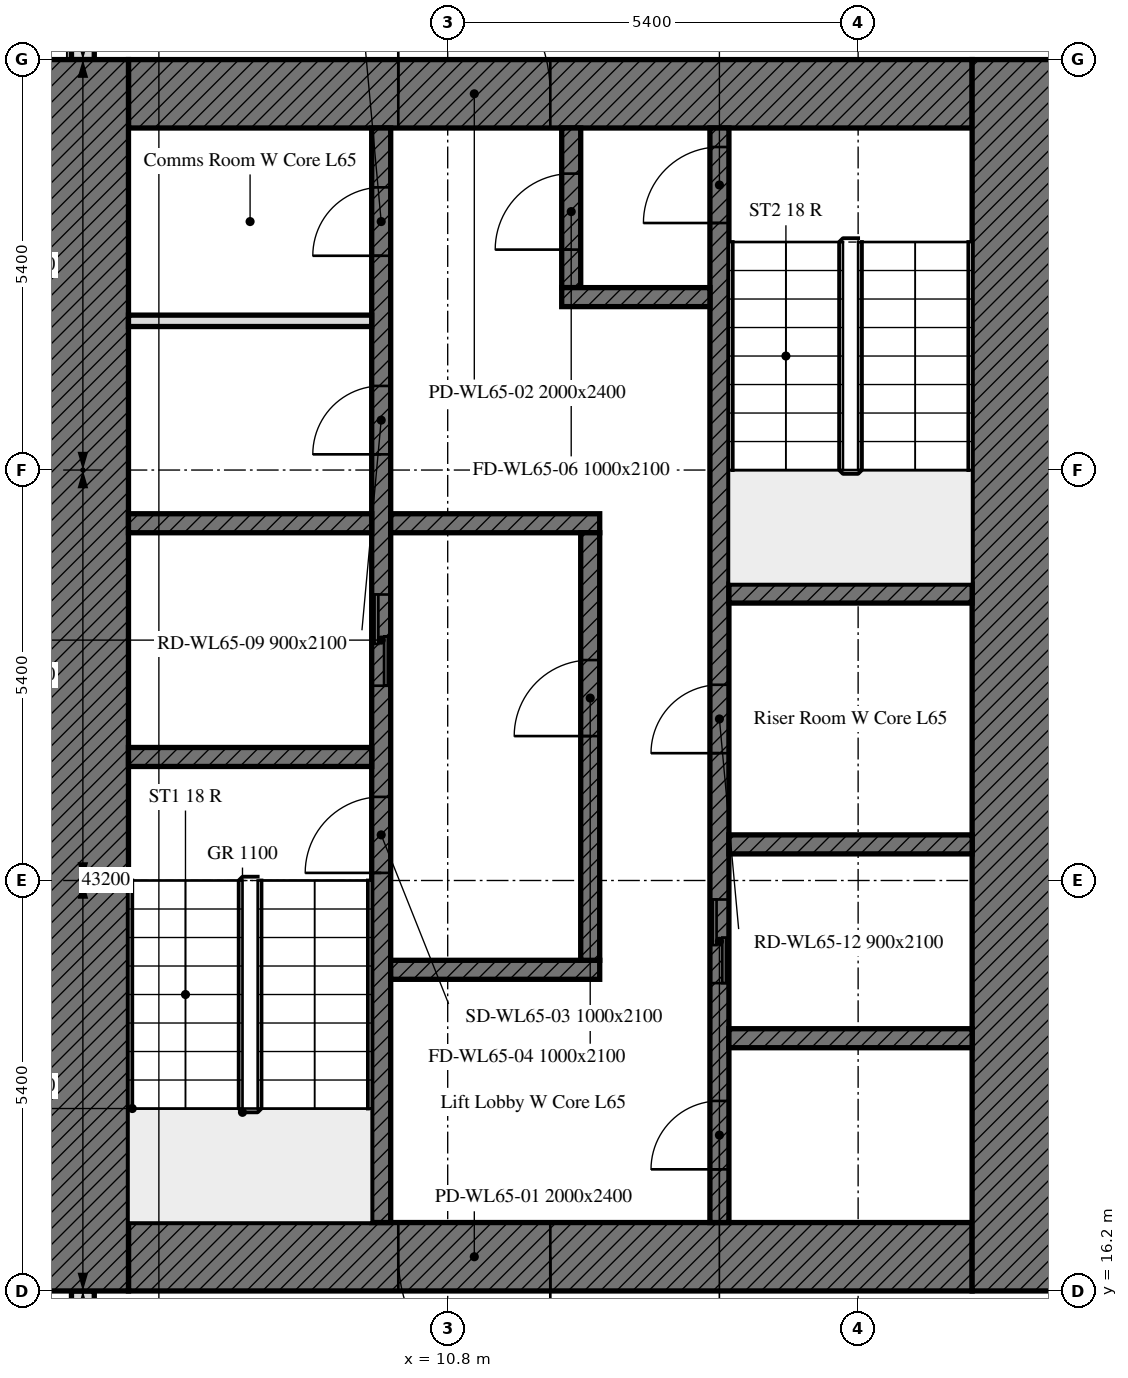
"""IFC4 building model, lengths in metres.
Left out: names, types, materials, properties, quantities, classifications, styles, units other than length and angle.
Written with IfcOpenShell. Run it as: python <this file> out.ifc"""

import sys

from ifc_helpers import new_model, si_unit, direction, frame, frame_2d, origin, place, context, subcontext, project, spatial, rectangle, extrude, element, fill, save


model = new_model("IFC4")
c1 = context("Model", 3, precision=1e-05, world=origin(), true_north=direction((0.0, 1.0)))
c2 = subcontext(c1, "Body", "Model", "MODEL_VIEW")
j1 = project(units=[si_unit("LENGTHUNIT", "METRE"), si_unit("PLANEANGLEUNIT", "RADIAN")], contexts=[c1])
p1 = place(None, origin())
s1 = spatial("IfcSite", under=j1, at=p1, CompositionType="ELEMENT")
p2 = place(p1, origin())
s2 = spatial("IfcBuilding", under=s1, at=p2, CompositionType="ELEMENT")
p3 = place(p2, frame((0.0, 0.0, 268.6)))
s3 = spatial("IfcBuildingStorey", under=s2, at=p3, CompositionType="ELEMENT", Elevation=268.6)
p4 = place(p3, frame((6.0, 37.614, 0.0), z_axis=(0.0, 0.0, 1.0), x_axis=(0.0, -1.0, 0.0)))
e1 = element("IfcWall", 1, at=p4, inside=s3, PredefinedType="SOLIDWALL", context=c2, shape_type="SweptSolid", body=[
    extrude(rectangle(XDim=5.214, YDim=0.3, at=frame_2d((2.607, 0.0))), origin(), (0.0, 0.0, 1.0), 3.0),
])
p5 = place(p4, frame((1.164, 0.0, 0.9)))
e2 = element("IfcOpeningElement", 2, at=p5, cuts=e1, PredefinedType="OPENING", context=c2, shape_type="SweptSolid", body=[
    extrude(rectangle(XDim=1.1, YDim=1.7, at=frame_2d((0.55, 0.85))), frame((0.0, 0.16, 0.0), z_axis=(0.0, -1.0, 0.0), x_axis=(1.0, 0.0, 0.0)), (0.0, 0.0, 1.0), 0.32),
])
p6 = place(p4, frame((3.139, 0.0, 0.9)))
e3 = element("IfcOpeningElement", 3, at=p6, cuts=e1, PredefinedType="OPENING", context=c2, shape_type="SweptSolid", body=[
    extrude(rectangle(XDim=0.65, YDim=1.7, at=frame_2d((0.325, 0.85))), frame((0.0, 0.16, 0.0), z_axis=(0.0, -1.0, 0.0), x_axis=(1.0, 0.0, 0.0)), (0.0, 0.0, 1.0), 0.32),
])
p7 = place(p3, frame((6.0, 16.2, 0.0), z_axis=(0.0, 0.0, 1.0), x_axis=(0.0, -1.0, 0.0)))
e4 = element("IfcWall", 4, at=p7, inside=s3, PredefinedType="SOLIDWALL", context=c2, shape_type="SweptSolid", body=[
    extrude(rectangle(XDim=10.614, YDim=0.3, at=frame_2d((5.307, 0.0))), origin(), (0.0, 0.0, 1.0), 3.0),
])
p8 = place(p7, frame((1.0, 0.0, 0.9)))
e5 = element("IfcOpeningElement", 5, at=p8, cuts=e4, PredefinedType="OPENING", context=c2, shape_type="SweptSolid", body=[
    extrude(rectangle(XDim=1.1, YDim=1.7, at=frame_2d((0.55, 0.85))), frame((0.0, 0.16, 0.0), z_axis=(0.0, -1.0, 0.0), x_axis=(1.0, 0.0, 0.0)), (0.0, 0.0, 1.0), 0.32),
])
p9 = place(p7, frame((2.95, 0.0, 0.9)))
e6 = element("IfcOpeningElement", 6, at=p9, cuts=e4, PredefinedType="OPENING", context=c2, shape_type="SweptSolid", body=[
    extrude(rectangle(XDim=1.1, YDim=1.7, at=frame_2d((0.55, 0.85))), frame((0.0, 0.16, 0.0), z_axis=(0.0, -1.0, 0.0), x_axis=(1.0, 0.0, 0.0)), (0.0, 0.0, 1.0), 0.32),
])
p10 = place(p7, frame((6.75, 0.0, 0.9)))
e7 = element("IfcOpeningElement", 7, at=p10, cuts=e4, PredefinedType="OPENING", context=c2, shape_type="SweptSolid", body=[
    extrude(rectangle(XDim=1.1, YDim=1.7, at=frame_2d((0.55, 0.85))), frame((0.0, 0.16, 0.0), z_axis=(0.0, -1.0, 0.0), x_axis=(1.0, 0.0, 0.0)), (0.0, 0.0, 1.0), 0.32),
])
p11 = place(p7, frame((8.2, 0.0, 0.9)))
e8 = element("IfcOpeningElement", 8, at=p11, cuts=e4, PredefinedType="OPENING", context=c2, shape_type="SweptSolid", body=[
    extrude(rectangle(XDim=1.1, YDim=1.7, at=frame_2d((0.55, 0.85))), frame((0.0, 0.16, 0.0), z_axis=(0.0, -1.0, 0.0), x_axis=(1.0, 0.0, 0.0)), (0.0, 0.0, 1.0), 0.32),
])
p12 = place(p3, frame((17.7, 16.65, 0.0), z_axis=(0.0, 0.0, 1.0), x_axis=(-1.0, 0.0, 0.0)))
e9 = element("IfcWall", 9, at=p12, inside=s3, PredefinedType="SOLIDWALL", context=c2, shape_type="SweptSolid", body=[
    extrude(rectangle(XDim=11.1, YDim=0.9, at=frame_2d((5.55, 0.0))), origin(), (0.0, 0.0, 1.0), 3.0),
])
p13 = place(p12, frame((5.55, 0.0, 0.0)))
e10 = element("IfcOpeningElement", 10, at=p13, cuts=e9, PredefinedType="OPENING", context=c2, shape_type="SweptSolid", body=[
    extrude(rectangle(XDim=2.0, YDim=2.4, at=frame_2d((1.0, 1.2))), frame((0.0, 0.45, 0.0), z_axis=(0.0, -1.0, 0.0), x_axis=(1.0, 0.0, 0.0)), (0.0, 0.0, 1.0), 0.9),
])
p14 = place(p3, frame((6.6, 31.95, 0.0), z_axis=(0.0, 0.0, 1.0), x_axis=(1.0, 0.0, 0.0)))
e11 = element("IfcWall", 11, at=p14, inside=s3, PredefinedType="SOLIDWALL", context=c2, shape_type="SweptSolid", body=[
    extrude(rectangle(XDim=11.1, YDim=0.9, at=frame_2d((5.55, 0.0))), origin(), (0.0, 0.0, 1.0), 3.0),
])
p15 = place(p14, frame((3.55, 0.0, 0.0)))
e12 = element("IfcOpeningElement", 12, at=p15, cuts=e11, PredefinedType="OPENING", context=c2, shape_type="SweptSolid", body=[
    extrude(rectangle(XDim=2.0, YDim=2.4, at=frame_2d((1.0, 1.2))), frame((0.0, 0.45, 0.0), z_axis=(0.0, -1.0, 0.0), x_axis=(1.0, 0.0, 0.0)), (0.0, 0.0, 1.0), 0.9),
])
for number, where, z_axis, x_axis in (
    (13, (6.0, 16.2, 0.0), (0.0, 0.0, 1.0), (0.0, 1.0, 0.0)),
    (14, (18.3, 32.4, 0.0), (0.0, 0.0, 1.0), (0.0, -1.0, 0.0)),
):
    element("IfcWall", number, at=place(p3, frame(where, z_axis=z_axis, x_axis=x_axis)), inside=s3, PredefinedType="SOLIDWALL", context=c2, shape_type="SweptSolid", body=[
        extrude(rectangle(XDim=16.2, YDim=1.2, at=frame_2d((8.1, 0.0))), origin(), (0.0, 0.0, 1.0), 3.0),
    ])
p16 = place(p3, frame((9.925, 17.1, 0.0), z_axis=(0.0, 0.0, 1.0), x_axis=(0.0, 1.0, 0.0)))
e15 = element("IfcWall", 15, at=p16, inside=s3, PredefinedType="SOLIDWALL", context=c2, shape_type="SweptSolid", body=[
    extrude(rectangle(XDim=14.4, YDim=0.25, at=frame_2d((7.2, 0.0))), origin(), (0.0, 0.0, 1.0), 3.0),
])
p17 = place(p16, frame((4.6, 0.0, 0.0)))
e16 = element("IfcOpeningElement", 16, at=p17, cuts=e15, PredefinedType="OPENING", context=c2, shape_type="SweptSolid", body=[
    extrude(rectangle(XDim=1.0, YDim=2.1, at=frame_2d((0.5, 1.05))), frame((0.0, 0.125, 0.0), z_axis=(0.0, -1.0, 0.0), x_axis=(1.0, 0.0, 0.0)), (0.0, 0.0, 1.0), 0.25),
])
p18 = place(p16, frame((7.062, 0.0, 0.0)))
e17 = element("IfcOpeningElement", 17, at=p18, cuts=e15, PredefinedType="OPENING", context=c2, shape_type="SweptSolid", body=[
    extrude(rectangle(XDim=1.2, YDim=2.1, at=frame_2d((0.6, 1.05))), frame((0.0, 0.125, 0.0), z_axis=(0.0, -1.0, 0.0), x_axis=(1.0, 0.0, 0.0)), (0.0, 0.0, 1.0), 0.25),
])
p19 = place(p16, frame((10.106, 0.0, 0.0)))
e18 = element("IfcOpeningElement", 18, at=p19, cuts=e15, PredefinedType="OPENING", context=c2, shape_type="SweptSolid", body=[
    extrude(rectangle(XDim=0.9, YDim=2.1, at=frame_2d((0.45, 1.05))), frame((0.0, 0.125, 0.0), z_axis=(0.0, -1.0, 0.0), x_axis=(1.0, 0.0, 0.0)), (0.0, 0.0, 1.0), 0.25),
])
p20 = place(p16, frame((12.719, 0.0, 0.0)))
e19 = element("IfcOpeningElement", 19, at=p20, cuts=e15, PredefinedType="OPENING", context=c2, shape_type="SweptSolid", body=[
    extrude(rectangle(XDim=0.9, YDim=2.1, at=frame_2d((0.45, 1.05))), frame((0.0, 0.125, 0.0), z_axis=(0.0, -1.0, 0.0), x_axis=(1.0, 0.0, 0.0)), (0.0, 0.0, 1.0), 0.25),
])
p21 = place(p3, frame((14.375, 17.1, 0.0), z_axis=(0.0, 0.0, 1.0), x_axis=(0.0, 1.0, 0.0)))
e20 = element("IfcWall", 20, at=p21, inside=s3, PredefinedType="SOLIDWALL", context=c2, shape_type="SweptSolid", body=[
    extrude(rectangle(XDim=14.4, YDim=0.25, at=frame_2d((7.2, 0.0))), origin(), (0.0, 0.0, 1.0), 3.0),
])
p22 = place(p21, frame((13.15, 0.0, 0.0)))
e21 = element("IfcOpeningElement", 21, at=p22, cuts=e20, PredefinedType="OPENING", context=c2, shape_type="SweptSolid", body=[
    extrude(rectangle(XDim=1.0, YDim=2.1, at=frame_2d((0.5, 1.05))), frame((0.0, 0.125, 0.0), z_axis=(0.0, -1.0, 0.0), x_axis=(1.0, 0.0, 0.0)), (0.0, 0.0, 1.0), 0.25),
])
p23 = place(p21, frame((3.15, 0.0, 0.0)))
e22 = element("IfcOpeningElement", 22, at=p23, cuts=e20, PredefinedType="OPENING", context=c2, shape_type="SweptSolid", body=[
    extrude(rectangle(XDim=1.1, YDim=2.1, at=frame_2d((0.55, 1.05))), frame((0.0, 0.125, 0.0), z_axis=(0.0, -1.0, 0.0), x_axis=(1.0, 0.0, 0.0)), (0.0, 0.0, 1.0), 0.25),
])
p24 = place(p21, frame((0.7, 0.0, 0.0)))
e23 = element("IfcOpeningElement", 23, at=p24, cuts=e20, PredefinedType="OPENING", context=c2, shape_type="SweptSolid", body=[
    extrude(rectangle(XDim=0.9, YDim=2.1, at=frame_2d((0.45, 1.05))), frame((0.0, 0.125, 0.0), z_axis=(0.0, -1.0, 0.0), x_axis=(1.0, 0.0, 0.0)), (0.0, 0.0, 1.0), 0.25),
])
p25 = place(p21, frame((6.175, 0.0, 0.0)))
e24 = element("IfcOpeningElement", 24, at=p25, cuts=e20, PredefinedType="OPENING", context=c2, shape_type="SweptSolid", body=[
    extrude(rectangle(XDim=0.9, YDim=2.1, at=frame_2d((0.45, 1.05))), frame((0.0, 0.125, 0.0), z_axis=(0.0, -1.0, 0.0), x_axis=(1.0, 0.0, 0.0)), (0.0, 0.0, 1.0), 0.25),
])
for number, where, z_axis, x_axis in (
    (25, (6.6, 23.225, 0.0), (0.0, 0.0, 1.0), (1.0, 0.0, 0.0)),
    (26, (14.5, 25.375, 0.0), (0.0, 0.0, 1.0), (1.0, 0.0, 0.0)),
    (27, (14.5, 22.075, 0.0), (0.0, 0.0, 1.0), (1.0, 0.0, 0.0)),
    (28, (6.6, 26.3, 0.0), (0.0, 0.0, 1.0), (1.0, 0.0, 0.0)),
):
    element("IfcWall", number, at=place(p3, frame(where, z_axis=z_axis, x_axis=x_axis)), inside=s3, PredefinedType="SOLIDWALL", context=c2, shape_type="SweptSolid", body=[
        extrude(rectangle(XDim=3.2, YDim=0.25, at=frame_2d((1.6, 0.0))), origin(), (0.0, 0.0, 1.0), 3.0),
    ])
for number, where, z_axis, x_axis in (
    (29, (10.05, 26.3, 0.0), (0.0, 0.0, 1.0), (1.0, 0.0, 0.0)),
    (30, (10.05, 20.425, 0.0), (0.0, 0.0, 1.0), (1.0, 0.0, 0.0)),
):
    element("IfcWall", number, at=place(p3, frame(where, z_axis=z_axis, x_axis=x_axis)), inside=s3, PredefinedType="SOLIDWALL", context=c2, shape_type="SweptSolid", body=[
        extrude(rectangle(XDim=2.75, YDim=0.25, at=frame_2d((1.375, 0.0))), origin(), (0.0, 0.0, 1.0), 3.0),
    ])
p26 = place(p3, frame((12.425, 29.4, 0.0), z_axis=(0.0, 0.0, 1.0), x_axis=(0.0, 1.0, 0.0)))
e31 = element("IfcWall", 31, at=p26, inside=s3, PredefinedType="SOLIDWALL", context=c2, shape_type="SweptSolid", body=[
    extrude(rectangle(XDim=2.1, YDim=0.25, at=frame_2d((1.05, 0.0))), origin(), (0.0, 0.0, 1.0), 3.0),
])
p27 = place(p26, frame((0.5, 0.0, 0.0)))
e32 = element("IfcOpeningElement", 32, at=p27, cuts=e31, PredefinedType="OPENING", context=c2, shape_type="SweptSolid", body=[
    extrude(rectangle(XDim=1.0, YDim=2.1, at=frame_2d((0.5, 1.05))), frame((0.0, 0.125, 0.0), z_axis=(0.0, -1.0, 0.0), x_axis=(1.0, 0.0, 0.0)), (0.0, 0.0, 1.0), 0.25),
])
p28 = place(p3, frame((12.3, 29.275, 0.0), z_axis=(0.0, 0.0, 1.0), x_axis=(1.0, 0.0, 0.0)))
e33 = element("IfcWall", 33, at=p28, inside=s3, PredefinedType="SOLIDWALL", context=c2, shape_type="SweptSolid", body=[
    extrude(rectangle(XDim=1.95, YDim=0.25, at=frame_2d((0.975, 0.0))), origin(), (0.0, 0.0, 1.0), 3.0),
])
p29 = place(p3, frame((12.675, 20.55, 0.0), z_axis=(0.0, 0.0, 1.0), x_axis=(0.0, 1.0, 0.0)))
e34 = element("IfcWall", 34, at=p29, inside=s3, PredefinedType="SOLIDWALL", context=c2, shape_type="SweptSolid", body=[
    extrude(rectangle(XDim=5.625, YDim=0.25, at=frame_2d((2.812, 0.0))), origin(), (0.0, 0.0, 1.0), 3.0),
])
p30 = place(p29, frame((2.95, 0.0, 0.0)))
e35 = element("IfcOpeningElement", 35, at=p30, cuts=e34, PredefinedType="OPENING", context=c2, shape_type="SweptSolid", body=[
    extrude(rectangle(XDim=1.0, YDim=2.1, at=frame_2d((0.5, 1.05))), frame((0.0, 0.125, 0.0), z_axis=(0.0, -1.0, 0.0), x_axis=(1.0, 0.0, 0.0)), (0.0, 0.0, 1.0), 0.25),
])
p31 = place(p3, frame((14.5, 19.525, 0.0), z_axis=(0.0, 0.0, 1.0), x_axis=(1.0, 0.0, 0.0)))
e36 = element("IfcWall", 36, at=p31, inside=s3, PredefinedType="SOLIDWALL", context=c2, shape_type="SweptSolid", body=[
    extrude(rectangle(XDim=3.2, YDim=0.25, at=frame_2d((1.6, 0.0))), origin(), (0.0, 0.0, 1.0), 3.0),
])
p32 = place(p3, frame((6.6, 28.963, 0.0), z_axis=(0.0, 0.0, 1.0), x_axis=(1.0, 0.0, 0.0)))
e37 = element("IfcWall", 37, at=p32, inside=s3, PredefinedType="PARTITIONING", context=c2, shape_type="SweptSolid", body=[
    extrude(rectangle(XDim=3.2, YDim=0.15, at=frame_2d((1.6, 0.0))), origin(), (0.0, 0.0, 1.0), 3.0),
])
p33 = place(p13, origin())
e38 = element("IfcDoor", 38, at=p33, inside=s3, OperationType="DOUBLE_DOOR_SINGLE_SWING", PredefinedType="DOOR", context=c2, shape_type="SweptSolid", body=[
    extrude(rectangle(XDim=2.0, YDim=2.4, at=frame_2d((1.0, 1.2))), frame((0.0, 0.025, 0.0), z_axis=(0.0, -1.0, 0.0), x_axis=(1.0, 0.0, 0.0)), (0.0, 0.0, 1.0), 0.05),
])
fill(e10, e38)
p34 = place(p15, origin())
e39 = element("IfcDoor", 39, at=p34, inside=s3, OperationType="DOUBLE_DOOR_SINGLE_SWING", PredefinedType="DOOR", context=c2, shape_type="SweptSolid", body=[
    extrude(rectangle(XDim=2.0, YDim=2.4, at=frame_2d((1.0, 1.2))), frame((0.0, 0.025, 0.0), z_axis=(0.0, -1.0, 0.0), x_axis=(1.0, 0.0, 0.0)), (0.0, 0.0, 1.0), 0.05),
])
fill(e12, e39)
p35 = place(p17, origin())
e40 = element("IfcDoor", 40, at=p35, inside=s3, OperationType="SINGLE_SWING_LEFT", PredefinedType="DOOR", context=c2, shape_type="SweptSolid", body=[
    extrude(rectangle(XDim=1.0, YDim=2.1, at=frame_2d((0.5, 1.05))), frame((0.0, 0.025, 0.0), z_axis=(0.0, -1.0, 0.0), x_axis=(1.0, 0.0, 0.0)), (0.0, 0.0, 1.0), 0.05),
])
fill(e16, e40)
p36 = place(p30, origin())
e41 = element("IfcDoor", 41, at=p36, inside=s3, OperationType="SINGLE_SWING_LEFT", PredefinedType="DOOR", context=c2, shape_type="SweptSolid", body=[
    extrude(rectangle(XDim=1.0, YDim=2.1, at=frame_2d((0.5, 1.05))), frame((0.0, 0.025, 0.0), z_axis=(0.0, -1.0, 0.0), x_axis=(1.0, 0.0, 0.0)), (0.0, 0.0, 1.0), 0.05),
])
fill(e35, e41)
p37 = place(p22, origin())
e42 = element("IfcDoor", 42, at=p37, inside=s3, OperationType="SINGLE_SWING_LEFT", PredefinedType="DOOR", context=c2, shape_type="SweptSolid", body=[
    extrude(rectangle(XDim=1.0, YDim=2.1, at=frame_2d((0.5, 1.05))), frame((0.0, 0.025, 0.0), z_axis=(0.0, -1.0, 0.0), x_axis=(1.0, 0.0, 0.0)), (0.0, 0.0, 1.0), 0.05),
])
fill(e21, e42)
p38 = place(p27, origin())
e43 = element("IfcDoor", 43, at=p38, inside=s3, OperationType="SINGLE_SWING_LEFT", PredefinedType="DOOR", context=c2, shape_type="SweptSolid", body=[
    extrude(rectangle(XDim=1.0, YDim=2.1, at=frame_2d((0.5, 1.05))), frame((0.0, 0.025, 0.0), z_axis=(0.0, -1.0, 0.0), x_axis=(1.0, 0.0, 0.0)), (0.0, 0.0, 1.0), 0.05),
])
fill(e32, e43)
p39 = place(p18, origin())
e44 = element("IfcDoor", 44, at=p39, inside=s3, OperationType="DOUBLE_DOOR_SLIDING", PredefinedType="DOOR", context=c2, shape_type="SweptSolid", body=[
    extrude(rectangle(XDim=1.2, YDim=2.1, at=frame_2d((0.6, 1.05))), frame((0.0, 0.025, 0.0), z_axis=(0.0, -1.0, 0.0), x_axis=(1.0, 0.0, 0.0)), (0.0, 0.0, 1.0), 0.05),
])
fill(e17, e44)
p40 = place(p23, origin())
e45 = element("IfcDoor", 45, at=p40, inside=s3, OperationType="DOUBLE_DOOR_SLIDING", PredefinedType="DOOR", context=c2, shape_type="SweptSolid", body=[
    extrude(rectangle(XDim=1.1, YDim=2.1, at=frame_2d((0.55, 1.05))), frame((0.0, 0.025, 0.0), z_axis=(0.0, -1.0, 0.0), x_axis=(1.0, 0.0, 0.0)), (0.0, 0.0, 1.0), 0.05),
])
fill(e22, e45)
p41 = place(p19, origin())
e46 = element("IfcDoor", 46, at=p41, inside=s3, OperationType="SINGLE_SWING_LEFT", PredefinedType="DOOR", context=c2, shape_type="SweptSolid", body=[
    extrude(rectangle(XDim=0.9, YDim=2.1, at=frame_2d((0.45, 1.05))), frame((0.0, 0.025, 0.0), z_axis=(0.0, -1.0, 0.0), x_axis=(1.0, 0.0, 0.0)), (0.0, 0.0, 1.0), 0.05),
])
fill(e18, e46)
p42 = place(p20, origin())
e47 = element("IfcDoor", 47, at=p42, inside=s3, OperationType="SINGLE_SWING_LEFT", PredefinedType="DOOR", context=c2, shape_type="SweptSolid", body=[
    extrude(rectangle(XDim=0.9, YDim=2.1, at=frame_2d((0.45, 1.05))), frame((0.0, 0.025, 0.0), z_axis=(0.0, -1.0, 0.0), x_axis=(1.0, 0.0, 0.0)), (0.0, 0.0, 1.0), 0.05),
])
fill(e19, e47)
p43 = place(p24, origin())
e48 = element("IfcDoor", 48, at=p43, inside=s3, OperationType="SINGLE_SWING_LEFT", PredefinedType="DOOR", context=c2, shape_type="SweptSolid", body=[
    extrude(rectangle(XDim=0.9, YDim=2.1, at=frame_2d((0.45, 1.05))), frame((0.0, 0.025, 0.0), z_axis=(0.0, -1.0, 0.0), x_axis=(1.0, 0.0, 0.0)), (0.0, 0.0, 1.0), 0.05),
])
fill(e23, e48)
p44 = place(p25, origin())
e49 = element("IfcDoor", 49, at=p44, inside=s3, OperationType="SINGLE_SWING_LEFT", PredefinedType="DOOR", context=c2, shape_type="SweptSolid", body=[
    extrude(rectangle(XDim=0.9, YDim=2.1, at=frame_2d((0.45, 1.05))), frame((0.0, 0.025, 0.0), z_axis=(0.0, -1.0, 0.0), x_axis=(1.0, 0.0, 0.0)), (0.0, 0.0, 1.0), 0.05),
])
fill(e24, e49)
save(model, sys.argv[1])
